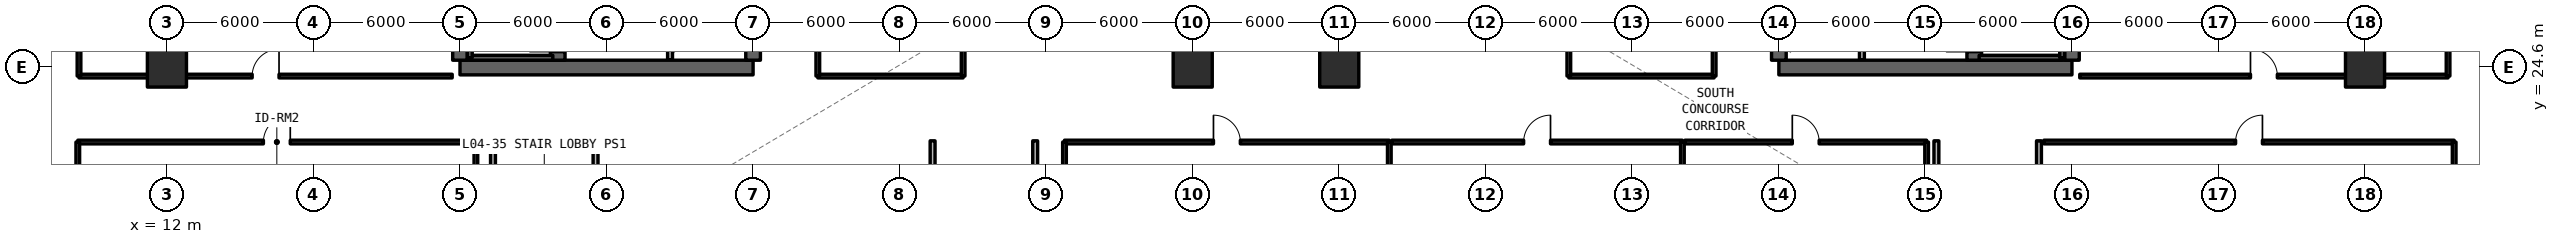
"""IFC4 building model, lengths in metres.
Left out: names, types, materials, properties, quantities, classifications, styles, units other than length and angle.
Written with IfcOpenShell. Run it as: python <this file> out.ifc"""

import sys

from ifc_helpers import new_model, si_unit, direction, frame, frame_2d, origin, origin_2d, place, context, subcontext, project, spatial, rectangle, extrude, element, fill, save


model = new_model("IFC4")
c1 = context("Model", 3, precision=1e-05, world=origin(), true_north=direction((0.0, 1.0)))
c2 = subcontext(c1, "Body", "Model", "MODEL_VIEW")
j1 = project(units=[si_unit("LENGTHUNIT", "METRE"), si_unit("PLANEANGLEUNIT", "RADIAN")], contexts=[c1])
p1 = place(None, origin())
s1 = spatial("IfcSite", under=j1, at=p1, CompositionType="ELEMENT")
p2 = place(p1, origin())
s2 = spatial("IfcBuilding", under=s1, at=p2, CompositionType="ELEMENT")
p3 = place(p2, frame((0.0, 0.0, 14.85)))
s3 = spatial("IfcBuildingStorey", under=s2, at=p3, CompositionType="ELEMENT", Elevation=14.85)
p4 = place(p3, frame((24.0, 24.6, 0.0), z_axis=(0.0, 0.0, 1.0), x_axis=(1.0, 0.0, 0.0)))
e1 = element("IfcWall", 1, at=p4, inside=s3, PredefinedType="SHEAR", context=c2, shape_type="SweptSolid", body=[
    extrude(rectangle(XDim=12.0, YDim=0.6, at=frame_2d((6.0, 0.0))), origin(), (0.0, 0.0, 1.0), 4.62),
])
p5 = place(p3, frame((24.0, 24.9, 0.0), z_axis=(0.0, 0.0, 1.0), x_axis=(0.0, 1.0, 0.0)))
e2 = element("IfcWall", 2, at=p5, inside=s3, PredefinedType="SHEAR", context=c2, shape_type="SweptSolid", body=[
    extrude(rectangle(XDim=17.4, YDim=0.6, at=frame_2d((8.7, 0.0))), origin(), (0.0, 0.0, 1.0), 4.62),
])
p6 = place(p3, frame((36.0, 24.9, 0.0), z_axis=(0.0, 0.0, 1.0), x_axis=(0.0, 1.0, 0.0)))
e3 = element("IfcWall", 3, at=p6, inside=s3, PredefinedType="SHEAR", context=c2, shape_type="SweptSolid", body=[
    extrude(rectangle(XDim=8.9, YDim=0.6, at=frame_2d((4.45, 0.0))), origin(), (0.0, 0.0, 1.0), 4.62),
])
p7 = place(p3, frame((28.0, 24.9, 0.0), z_axis=(0.0, 0.0, 1.0), x_axis=(0.0, 1.0, 0.0)))
e4 = element("IfcWall", 4, at=p7, inside=s3, PredefinedType="SHEAR", context=c2, shape_type="SweptSolid", body=[
    extrude(rectangle(XDim=17.4, YDim=0.6, at=frame_2d((8.7, 0.0))), origin(), (0.0, 0.0, 1.0), 4.62),
])
p8 = place(p7, frame((0.35, 0.0, 0.0)))
e5 = element("IfcOpeningElement", 5, at=p8, cuts=e4, PredefinedType="OPENING", context=c2, shape_type="SweptSolid", body=[
    extrude(rectangle(XDim=1.15, YDim=2.15, at=frame_2d((0.575, 1.075))), frame((0.0, 0.31, 0.0), z_axis=(0.0, -1.0, 0.0), x_axis=(1.0, 0.0, 0.0)), (0.0, 0.0, 1.0), 0.62),
])
p9 = place(p7, frame((9.55, 0.0, 0.0)))
e6 = element("IfcOpeningElement", 6, at=p9, cuts=e4, PredefinedType="OPENING", context=c2, shape_type="SweptSolid", body=[
    extrude(rectangle(XDim=1.15, YDim=2.15, at=frame_2d((0.575, 1.075))), frame((0.0, 0.31, 0.0), z_axis=(0.0, -1.0, 0.0), x_axis=(1.0, 0.0, 0.0)), (0.0, 0.0, 1.0), 0.62),
])
p10 = place(p3, frame((78.0, 24.6, 0.0), z_axis=(0.0, 0.0, 1.0), x_axis=(1.0, 0.0, 0.0)))
e7 = element("IfcWall", 7, at=p10, inside=s3, PredefinedType="SHEAR", context=c2, shape_type="SweptSolid", body=[
    extrude(rectangle(XDim=12.0, YDim=0.6, at=frame_2d((6.0, 0.0))), origin(), (0.0, 0.0, 1.0), 4.62),
])
p11 = place(p3, frame((90.0, 24.9, 0.0), z_axis=(0.0, 0.0, 1.0), x_axis=(0.0, 1.0, 0.0)))
e8 = element("IfcWall", 8, at=p11, inside=s3, PredefinedType="SHEAR", context=c2, shape_type="SweptSolid", body=[
    extrude(rectangle(XDim=17.4, YDim=0.6, at=frame_2d((8.7, 0.0))), origin(), (0.0, 0.0, 1.0), 4.62),
])
p12 = place(p3, frame((78.0, 24.9, 0.0), z_axis=(0.0, 0.0, 1.0), x_axis=(0.0, 1.0, 0.0)))
e9 = element("IfcWall", 9, at=p12, inside=s3, PredefinedType="SHEAR", context=c2, shape_type="SweptSolid", body=[
    extrude(rectangle(XDim=8.9, YDim=0.6, at=frame_2d((4.45, 0.0))), origin(), (0.0, 0.0, 1.0), 4.62),
])
p13 = place(p3, frame((86.0, 24.9, 0.0), z_axis=(0.0, 0.0, 1.0), x_axis=(0.0, 1.0, 0.0)))
e10 = element("IfcWall", 10, at=p13, inside=s3, PredefinedType="SHEAR", context=c2, shape_type="SweptSolid", body=[
    extrude(rectangle(XDim=17.4, YDim=0.6, at=frame_2d((8.7, 0.0))), origin(), (0.0, 0.0, 1.0), 4.62),
])
p14 = place(p13, frame((0.35, 0.0, 0.0)))
e11 = element("IfcOpeningElement", 11, at=p14, cuts=e10, PredefinedType="OPENING", context=c2, shape_type="SweptSolid", body=[
    extrude(rectangle(XDim=1.15, YDim=2.15, at=frame_2d((0.575, 1.075))), frame((0.0, 0.31, 0.0), z_axis=(0.0, -1.0, 0.0), x_axis=(1.0, 0.0, 0.0)), (0.0, 0.0, 1.0), 0.62),
])
p15 = place(p13, frame((9.55, 0.0, 0.0)))
e12 = element("IfcOpeningElement", 12, at=p15, cuts=e10, PredefinedType="OPENING", context=c2, shape_type="SweptSolid", body=[
    extrude(rectangle(XDim=1.15, YDim=2.15, at=frame_2d((0.575, 1.075))), frame((0.0, 0.31, 0.0), z_axis=(0.0, -1.0, 0.0), x_axis=(1.0, 0.0, 0.0)), (0.0, 0.0, 1.0), 0.62),
])
for number, where, z_axis, x_axis in (
    (13, (12.0, 24.6, 0.0), (0.0, 0.0, 1.0), (1.0, 0.0, 0.0)),
    (14, (54.0, 24.6, 0.0), (0.0, 0.0, 1.0), (1.0, 0.0, 0.0)),
    (15, (60.0, 24.6, 0.0), (0.0, 0.0, 1.0), (1.0, 0.0, 0.0)),
    (16, (102.0, 24.6, 0.0), (0.0, 0.0, 1.0), (1.0, 0.0, 0.0)),
):
    element("IfcColumn", number, at=place(p3, frame(where, z_axis=z_axis, x_axis=x_axis)), inside=s3, PredefinedType="COLUMN", context=c2, shape_type="SweptSolid", body=[
        extrude(rectangle(XDim=1.6, YDim=1.6, at=origin_2d()), origin(), (0.0, 0.0, 1.0), 4.62),
    ])
p16 = place(p3, frame((32.6, 24.92, 0.0), z_axis=(0.0, 0.0, 1.0), x_axis=(0.0, 1.0, 0.0)))
e17 = element("IfcWall", 17, at=p16, inside=s3, PredefinedType="SOLIDWALL", context=c2, shape_type="SweptSolid", body=[
    extrude(rectangle(XDim=3.58, YDim=0.2, at=frame_2d((1.79, 0.0))), origin(), (0.0, 0.0, 1.0), 3.56),
])
p17 = place(p16, frame((1.3, 0.0, 0.0)))
e18 = element("IfcOpeningElement", 18, at=p17, cuts=e17, PredefinedType="OPENING", context=c2, shape_type="SweptSolid", body=[
    extrude(rectangle(XDim=1.1, YDim=2.2, at=frame_2d((0.55, 1.1))), frame((0.0, 0.11, 0.0), z_axis=(0.0, -1.0, 0.0), x_axis=(1.0, 0.0, 0.0)), (0.0, 0.0, 1.0), 0.22),
])
p18 = place(p3, frame((81.4, 24.92, 0.0), z_axis=(0.0, 0.0, 1.0), x_axis=(0.0, 1.0, 0.0)))
e19 = element("IfcWall", 19, at=p18, inside=s3, PredefinedType="SOLIDWALL", context=c2, shape_type="SweptSolid", body=[
    extrude(rectangle(XDim=3.58, YDim=0.2, at=frame_2d((1.79, 0.0))), origin(), (0.0, 0.0, 1.0), 3.56),
])
p19 = place(p18, frame((1.3, 0.0, 0.0)))
e20 = element("IfcOpeningElement", 20, at=p19, cuts=e19, PredefinedType="OPENING", context=c2, shape_type="SweptSolid", body=[
    extrude(rectangle(XDim=1.1, YDim=2.2, at=frame_2d((0.55, 1.1))), frame((0.0, 0.11, 0.0), z_axis=(0.0, -1.0, 0.0), x_axis=(1.0, 0.0, 0.0)), (0.0, 0.0, 1.0), 0.22),
])
for number, where, z_axis, x_axis in (
    (21, (25.35, 17.0, 0.0), (0.0, 0.0, 1.0), (0.0, 1.0, 0.0)),
    (22, (29.55, 17.0, 0.0), (0.0, 0.0, 1.0), (0.0, 1.0, 0.0)),
    (23, (43.35, 17.0, 0.0), (0.0, 0.0, 1.0), (0.0, 1.0, 0.0)),
    (24, (47.55, 17.0, 0.0), (0.0, 0.0, 1.0), (0.0, 1.0, 0.0)),
    (25, (84.45, 17.0, 0.0), (0.0, 0.0, 1.0), (0.0, 1.0, 0.0)),
    (26, (88.65, 17.0, 0.0), (0.0, 0.0, 1.0), (0.0, 1.0, 0.0)),
):
    element("IfcWall", number, at=place(p3, frame(where, z_axis=z_axis, x_axis=x_axis)), inside=s3, PredefinedType="SOLIDWALL", context=c2, shape_type="SweptSolid", body=[
        extrude(rectangle(XDim=4.6, YDim=0.2, at=frame_2d((2.3, 0.0))), origin(), (0.0, 0.0, 1.0), 3.56),
    ])
p20 = place(p3, frame((8.35, 21.55, 0.0), z_axis=(0.0, 0.0, 1.0), x_axis=(1.0, 0.0, 0.0)))
e27 = element("IfcWall", 27, at=p20, inside=s3, PredefinedType="SOLIDWALL", context=c2, shape_type="SweptSolid", body=[
    extrude(rectangle(XDim=16.3, YDim=0.15, at=frame_2d((8.15, 0.0))), origin(), (0.0, 0.0, 1.0), 3.56),
])
p21 = place(p20, frame((7.6, 0.0, 0.0)))
e28 = element("IfcOpeningElement", 28, at=p21, cuts=e27, PredefinedType="OPENING", context=c2, shape_type="SweptSolid", body=[
    extrude(rectangle(XDim=1.1, YDim=2.15, at=frame_2d((0.55, 1.075))), frame((0.0, 0.085, 0.0), z_axis=(0.0, -1.0, 0.0), x_axis=(1.0, 0.0, 0.0)), (0.0, 0.0, 1.0), 0.17),
])
for number, where, z_axis, x_axis in (
    (29, (8.35, 3.14, 0.0), (0.0, 0.0, 1.0), (0.0, 1.0, 0.0)),
    (30, (24.65, 3.14, 0.0), (0.0, 0.0, 1.0), (0.0, 1.0, 0.0)),
):
    element("IfcWall", number, at=place(p3, frame(where, z_axis=z_axis, x_axis=x_axis)), inside=s3, PredefinedType="SOLIDWALL", context=c2, shape_type="SweptSolid", body=[
        extrude(rectangle(XDim=18.41, YDim=0.15, at=frame_2d((9.205, 0.0))), origin(), (0.0, 0.0, 1.0), 3.56),
    ])
p22 = place(p3, frame((48.75, 21.55, 0.0), z_axis=(0.0, 0.0, 1.0), x_axis=(1.0, 0.0, 0.0)))
e31 = element("IfcWall", 31, at=p22, inside=s3, PredefinedType="SOLIDWALL", context=c2, shape_type="SweptSolid", body=[
    extrude(rectangle(XDim=13.3, YDim=0.15, at=frame_2d((6.65, 0.0))), origin(), (0.0, 0.0, 1.0), 3.56),
])
p23 = place(p22, frame((6.1, 0.0, 0.0)))
e32 = element("IfcOpeningElement", 32, at=p23, cuts=e31, PredefinedType="OPENING", context=c2, shape_type="SweptSolid", body=[
    extrude(rectangle(XDim=1.1, YDim=2.15, at=frame_2d((0.55, 1.075))), frame((0.0, 0.085, 0.0), z_axis=(0.0, -1.0, 0.0), x_axis=(1.0, 0.0, 0.0)), (0.0, 0.0, 1.0), 0.17),
])
for number, where, z_axis, x_axis in (
    (33, (48.75, 3.14, 0.0), (0.0, 0.0, 1.0), (0.0, 1.0, 0.0)),
    (34, (62.05, 3.14, 0.0), (0.0, 0.0, 1.0), (0.0, 1.0, 0.0)),
):
    element("IfcWall", number, at=place(p3, frame(where, z_axis=z_axis, x_axis=x_axis)), inside=s3, PredefinedType="SOLIDWALL", context=c2, shape_type="SweptSolid", body=[
        extrude(rectangle(XDim=18.41, YDim=0.15, at=frame_2d((9.205, 0.0))), origin(), (0.0, 0.0, 1.0), 3.56),
    ])
p24 = place(p3, frame((62.15, 21.55, 0.0), z_axis=(0.0, 0.0, 1.0), x_axis=(1.0, 0.0, 0.0)))
e35 = element("IfcWall", 35, at=p24, inside=s3, PredefinedType="SOLIDWALL", context=c2, shape_type="SweptSolid", body=[
    extrude(rectangle(XDim=11.9, YDim=0.15, at=frame_2d((5.95, 0.0))), origin(), (0.0, 0.0, 1.0), 3.56),
])
p25 = place(p24, frame((5.4, 0.0, 0.0)))
e36 = element("IfcOpeningElement", 36, at=p25, cuts=e35, PredefinedType="OPENING", context=c2, shape_type="SweptSolid", body=[
    extrude(rectangle(XDim=1.1, YDim=2.15, at=frame_2d((0.55, 1.075))), frame((0.0, 0.085, 0.0), z_axis=(0.0, -1.0, 0.0), x_axis=(1.0, 0.0, 0.0)), (0.0, 0.0, 1.0), 0.17),
])
p26 = place(p3, frame((74.05, 3.14, 0.0), z_axis=(0.0, 0.0, 1.0), x_axis=(0.0, 1.0, 0.0)))
e37 = element("IfcWall", 37, at=p26, inside=s3, PredefinedType="SOLIDWALL", context=c2, shape_type="SweptSolid", body=[
    extrude(rectangle(XDim=18.41, YDim=0.15, at=frame_2d((9.205, 0.0))), origin(), (0.0, 0.0, 1.0), 3.56),
])
p27 = place(p3, frame((74.15, 21.55, 0.0), z_axis=(0.0, 0.0, 1.0), x_axis=(1.0, 0.0, 0.0)))
e38 = element("IfcWall", 38, at=p27, inside=s3, PredefinedType="SOLIDWALL", context=c2, shape_type="SweptSolid", body=[
    extrude(rectangle(XDim=9.9, YDim=0.15, at=frame_2d((4.95, 0.0))), origin(), (0.0, 0.0, 1.0), 3.56),
])
p28 = place(p27, frame((4.4, 0.0, 0.0)))
e39 = element("IfcOpeningElement", 39, at=p28, cuts=e38, PredefinedType="OPENING", context=c2, shape_type="SweptSolid", body=[
    extrude(rectangle(XDim=1.1, YDim=2.15, at=frame_2d((0.55, 1.075))), frame((0.0, 0.085, 0.0), z_axis=(0.0, -1.0, 0.0), x_axis=(1.0, 0.0, 0.0)), (0.0, 0.0, 1.0), 0.17),
])
p29 = place(p3, frame((84.05, 3.14, 0.0), z_axis=(0.0, 0.0, 1.0), x_axis=(0.0, 1.0, 0.0)))
e40 = element("IfcWall", 40, at=p29, inside=s3, PredefinedType="SOLIDWALL", context=c2, shape_type="SweptSolid", body=[
    extrude(rectangle(XDim=18.41, YDim=0.15, at=frame_2d((9.205, 0.0))), origin(), (0.0, 0.0, 1.0), 3.56),
])
p30 = place(p3, frame((88.85, 21.55, 0.0), z_axis=(0.0, 0.0, 1.0), x_axis=(1.0, 0.0, 0.0)))
e41 = element("IfcWall", 41, at=p30, inside=s3, PredefinedType="SOLIDWALL", context=c2, shape_type="SweptSolid", body=[
    extrude(rectangle(XDim=16.8, YDim=0.15, at=frame_2d((8.4, 0.0))), origin(), (0.0, 0.0, 1.0), 3.56),
])
p31 = place(p30, frame((7.85, 0.0, 0.0)))
e42 = element("IfcOpeningElement", 42, at=p31, cuts=e41, PredefinedType="OPENING", context=c2, shape_type="SweptSolid", body=[
    extrude(rectangle(XDim=1.1, YDim=2.15, at=frame_2d((0.55, 1.075))), frame((0.0, 0.085, 0.0), z_axis=(0.0, -1.0, 0.0), x_axis=(1.0, 0.0, 0.0)), (0.0, 0.0, 1.0), 0.17),
])
p32 = place(p3, frame((105.65, 3.14, 0.0), z_axis=(0.0, 0.0, 1.0), x_axis=(0.0, 1.0, 0.0)))
e43 = element("IfcWall", 43, at=p32, inside=s3, PredefinedType="SOLIDWALL", context=c2, shape_type="SweptSolid", body=[
    extrude(rectangle(XDim=18.41, YDim=0.15, at=frame_2d((9.205, 0.0))), origin(), (0.0, 0.0, 1.0), 3.56),
])
p33 = place(p3, frame((38.65, 24.25, 0.0), z_axis=(0.0, 0.0, 1.0), x_axis=(1.0, 0.0, 0.0)))
e44 = element("IfcWall", 44, at=p33, inside=s3, PredefinedType="SOLIDWALL", context=c2, shape_type="SweptSolid", body=[
    extrude(rectangle(XDim=5.95, YDim=0.15, at=frame_2d((2.975, 0.0))), origin(), (0.0, 0.0, 1.0), 3.56),
])
p34 = place(p3, frame((38.65, 24.25, 0.0), z_axis=(0.0, 0.0, 1.0), x_axis=(0.0, 1.0, 0.0)))
e45 = element("IfcWall", 45, at=p34, inside=s3, PredefinedType="SOLIDWALL", context=c2, shape_type="SweptSolid", body=[
    extrude(rectangle(XDim=18.7, YDim=0.15, at=frame_2d((9.35, 0.0))), origin(), (0.0, 0.0, 1.0), 3.56),
])
p35 = place(p34, frame((8.525, 0.0, 0.0)))
e46 = element("IfcOpeningElement", 46, at=p35, cuts=e45, PredefinedType="OPENING", context=c2, shape_type="SweptSolid", body=[
    extrude(rectangle(XDim=0.95, YDim=2.15, at=frame_2d((0.475, 1.075))), frame((0.0, 0.085, 0.0), z_axis=(0.0, -1.0, 0.0), x_axis=(1.0, 0.0, 0.0)), (0.0, 0.0, 1.0), 0.17),
])
p36 = place(p3, frame((44.6, 24.25, 0.0), z_axis=(0.0, 0.0, 1.0), x_axis=(0.0, 1.0, 0.0)))
e47 = element("IfcWall", 47, at=p36, inside=s3, PredefinedType="SOLIDWALL", context=c2, shape_type="SweptSolid", body=[
    extrude(rectangle(XDim=18.7, YDim=0.15, at=frame_2d((9.35, 0.0))), origin(), (0.0, 0.0, 1.0), 3.56),
])
p37 = place(p3, frame((69.4, 24.25, 0.0), z_axis=(0.0, 0.0, 1.0), x_axis=(1.0, 0.0, 0.0)))
e48 = element("IfcWall", 48, at=p37, inside=s3, PredefinedType="SOLIDWALL", context=c2, shape_type="SweptSolid", body=[
    extrude(rectangle(XDim=5.95, YDim=0.15, at=frame_2d((2.975, 0.0))), origin(), (0.0, 0.0, 1.0), 3.56),
])
p38 = place(p3, frame((69.4, 24.25, 0.0), z_axis=(0.0, 0.0, 1.0), x_axis=(0.0, 1.0, 0.0)))
e49 = element("IfcWall", 49, at=p38, inside=s3, PredefinedType="SOLIDWALL", context=c2, shape_type="SweptSolid", body=[
    extrude(rectangle(XDim=18.7, YDim=0.15, at=frame_2d((9.35, 0.0))), origin(), (0.0, 0.0, 1.0), 3.56),
])
p39 = place(p3, frame((75.35, 24.25, 0.0), z_axis=(0.0, 0.0, 1.0), x_axis=(0.0, 1.0, 0.0)))
e50 = element("IfcWall", 50, at=p39, inside=s3, PredefinedType="SOLIDWALL", context=c2, shape_type="SweptSolid", body=[
    extrude(rectangle(XDim=18.7, YDim=0.15, at=frame_2d((9.35, 0.0))), origin(), (0.0, 0.0, 1.0), 3.56),
])
p40 = place(p39, frame((8.525, 0.0, 0.0)))
e51 = element("IfcOpeningElement", 51, at=p40, cuts=e50, PredefinedType="OPENING", context=c2, shape_type="SweptSolid", body=[
    extrude(rectangle(XDim=0.95, YDim=2.15, at=frame_2d((0.475, 1.075))), frame((0.0, 0.085, 0.0), z_axis=(0.0, -1.0, 0.0), x_axis=(1.0, 0.0, 0.0)), (0.0, 0.0, 1.0), 0.17),
])
p41 = place(p3, frame((8.4, 24.25, 0.0), z_axis=(0.0, 0.0, 1.0), x_axis=(1.0, 0.0, 0.0)))
e52 = element("IfcWall", 52, at=p41, inside=s3, PredefinedType="SOLIDWALL", context=c2, shape_type="SweptSolid", body=[
    extrude(rectangle(XDim=15.28, YDim=0.15, at=frame_2d((7.64, 0.0))), origin(), (0.0, 0.0, 1.0), 3.56),
])
p42 = place(p41, frame((7.09, 0.0, 0.0)))
e53 = element("IfcOpeningElement", 53, at=p42, cuts=e52, PredefinedType="OPENING", context=c2, shape_type="SweptSolid", body=[
    extrude(rectangle(XDim=1.1, YDim=2.15, at=frame_2d((0.55, 1.075))), frame((0.0, 0.085, 0.0), z_axis=(0.0, -1.0, 0.0), x_axis=(1.0, 0.0, 0.0)), (0.0, 0.0, 1.0), 0.17),
])
p43 = place(p3, frame((8.4, 24.25, 0.0), z_axis=(0.0, 0.0, 1.0), x_axis=(0.0, 1.0, 0.0)))
e54 = element("IfcWall", 54, at=p43, inside=s3, PredefinedType="SOLIDWALL", context=c2, shape_type="SweptSolid", body=[
    extrude(rectangle(XDim=18.7, YDim=0.15, at=frame_2d((9.35, 0.0))), origin(), (0.0, 0.0, 1.0), 3.56),
])
p44 = place(p3, frame((90.32, 24.25, 0.0), z_axis=(0.0, 0.0, 1.0), x_axis=(1.0, 0.0, 0.0)))
e55 = element("IfcWall", 55, at=p44, inside=s3, PredefinedType="SOLIDWALL", context=c2, shape_type="SweptSolid", body=[
    extrude(rectangle(XDim=15.08, YDim=0.15, at=frame_2d((7.54, 0.0))), origin(), (0.0, 0.0, 1.0), 3.56),
])
p45 = place(p44, frame((6.99, 0.0, 0.0)))
e56 = element("IfcOpeningElement", 56, at=p45, cuts=e55, PredefinedType="OPENING", context=c2, shape_type="SweptSolid", body=[
    extrude(rectangle(XDim=1.1, YDim=2.15, at=frame_2d((0.55, 1.075))), frame((0.0, 0.085, 0.0), z_axis=(0.0, -1.0, 0.0), x_axis=(1.0, 0.0, 0.0)), (0.0, 0.0, 1.0), 0.17),
])
p46 = place(p3, frame((105.4, 24.25, 0.0), z_axis=(0.0, 0.0, 1.0), x_axis=(0.0, 1.0, 0.0)))
e57 = element("IfcWall", 57, at=p46, inside=s3, PredefinedType="SOLIDWALL", context=c2, shape_type="SweptSolid", body=[
    extrude(rectangle(XDim=18.7, YDim=0.15, at=frame_2d((9.35, 0.0))), origin(), (0.0, 0.0, 1.0), 3.56),
])
p47 = place(p3, frame((24.4, 25.0, 0.0), z_axis=(0.0, 0.0, 1.0), x_axis=(1.0, 0.0, 0.0)))
e58 = element("IfcWall", 58, at=p47, inside=s3, PredefinedType="SOLIDWALL", context=c2, shape_type="SweptSolid", body=[
    extrude(rectangle(XDim=3.4, YDim=0.2, at=frame_2d((1.7, 0.0))), origin(), (0.0, 0.0, 1.0), 4.62),
])
p48 = place(p3, frame((24.4, 33.0, 0.0), z_axis=(0.0, 0.0, 1.0), x_axis=(0.0, -1.0, 0.0)))
e59 = element("IfcWall", 59, at=p48, inside=s3, PredefinedType="SOLIDWALL", context=c2, shape_type="SweptSolid", body=[
    extrude(rectangle(XDim=8.0, YDim=0.2, at=frame_2d((4.0, 0.0))), origin(), (0.0, 0.0, 1.0), 4.62),
])
p49 = place(p3, frame((86.2, 25.0, 0.0), z_axis=(0.0, 0.0, 1.0), x_axis=(1.0, 0.0, 0.0)))
e60 = element("IfcWall", 60, at=p49, inside=s3, PredefinedType="SOLIDWALL", context=c2, shape_type="SweptSolid", body=[
    extrude(rectangle(XDim=3.4, YDim=0.2, at=frame_2d((1.7, 0.0))), origin(), (0.0, 0.0, 1.0), 4.62),
])
p50 = place(p3, frame((89.6, 25.0, 0.0), z_axis=(0.0, 0.0, 1.0), x_axis=(0.0, 1.0, 0.0)))
e61 = element("IfcWall", 61, at=p50, inside=s3, PredefinedType="SOLIDWALL", context=c2, shape_type="SweptSolid", body=[
    extrude(rectangle(XDim=8.0, YDim=0.2, at=frame_2d((4.0, 0.0))), origin(), (0.0, 0.0, 1.0), 4.62),
])
p51 = place(p21, origin())
e62 = element("IfcDoor", 62, at=p51, inside=s3, OperationType="SINGLE_SWING_RIGHT", PredefinedType="DOOR", context=c2, shape_type="SweptSolid", body=[
    extrude(rectangle(XDim=1.1, YDim=2.15, at=frame_2d((0.55, 1.075))), frame((0.0, 0.025, 0.0), z_axis=(0.0, -1.0, 0.0), x_axis=(1.0, 0.0, 0.0)), (0.0, 0.0, 1.0), 0.05),
])
fill(e28, e62)
p52 = place(p23, origin())
e63 = element("IfcDoor", 63, at=p52, inside=s3, OperationType="SINGLE_SWING_LEFT", PredefinedType="DOOR", context=c2, shape_type="SweptSolid", body=[
    extrude(rectangle(XDim=1.1, YDim=2.15, at=frame_2d((0.55, 1.075))), frame((0.0, 0.025, 0.0), z_axis=(0.0, -1.0, 0.0), x_axis=(1.0, 0.0, 0.0)), (0.0, 0.0, 1.0), 0.05),
])
fill(e32, e63)
p53 = place(p25, origin())
e64 = element("IfcDoor", 64, at=p53, inside=s3, OperationType="SINGLE_SWING_RIGHT", PredefinedType="DOOR", context=c2, shape_type="SweptSolid", body=[
    extrude(rectangle(XDim=1.1, YDim=2.15, at=frame_2d((0.55, 1.075))), frame((0.0, 0.025, 0.0), z_axis=(0.0, -1.0, 0.0), x_axis=(1.0, 0.0, 0.0)), (0.0, 0.0, 1.0), 0.05),
])
fill(e36, e64)
p54 = place(p28, origin())
e65 = element("IfcDoor", 65, at=p54, inside=s3, OperationType="SINGLE_SWING_LEFT", PredefinedType="DOOR", context=c2, shape_type="SweptSolid", body=[
    extrude(rectangle(XDim=1.1, YDim=2.15, at=frame_2d((0.55, 1.075))), frame((0.0, 0.025, 0.0), z_axis=(0.0, -1.0, 0.0), x_axis=(1.0, 0.0, 0.0)), (0.0, 0.0, 1.0), 0.05),
])
fill(e39, e65)
p55 = place(p31, origin())
e66 = element("IfcDoor", 66, at=p55, inside=s3, OperationType="SINGLE_SWING_RIGHT", PredefinedType="DOOR", context=c2, shape_type="SweptSolid", body=[
    extrude(rectangle(XDim=1.1, YDim=2.15, at=frame_2d((0.55, 1.075))), frame((0.0, 0.025, 0.0), z_axis=(0.0, -1.0, 0.0), x_axis=(1.0, 0.0, 0.0)), (0.0, 0.0, 1.0), 0.05),
])
fill(e42, e66)
p56 = place(p42, origin())
e67 = element("IfcDoor", 67, at=p56, inside=s3, OperationType="SINGLE_SWING_RIGHT", PredefinedType="DOOR", context=c2, shape_type="SweptSolid", body=[
    extrude(rectangle(XDim=1.1, YDim=2.15, at=frame_2d((0.55, 1.075))), frame((0.0, 0.025, 0.0), z_axis=(0.0, -1.0, 0.0), x_axis=(1.0, 0.0, 0.0)), (0.0, 0.0, 1.0), 0.05),
])
fill(e53, e67)
p57 = place(p45, origin())
e68 = element("IfcDoor", 68, at=p57, inside=s3, OperationType="SINGLE_SWING_LEFT", PredefinedType="DOOR", context=c2, shape_type="SweptSolid", body=[
    extrude(rectangle(XDim=1.1, YDim=2.15, at=frame_2d((0.55, 1.075))), frame((0.0, 0.025, 0.0), z_axis=(0.0, -1.0, 0.0), x_axis=(1.0, 0.0, 0.0)), (0.0, 0.0, 1.0), 0.05),
])
fill(e56, e68)
save(model, sys.argv[1])
